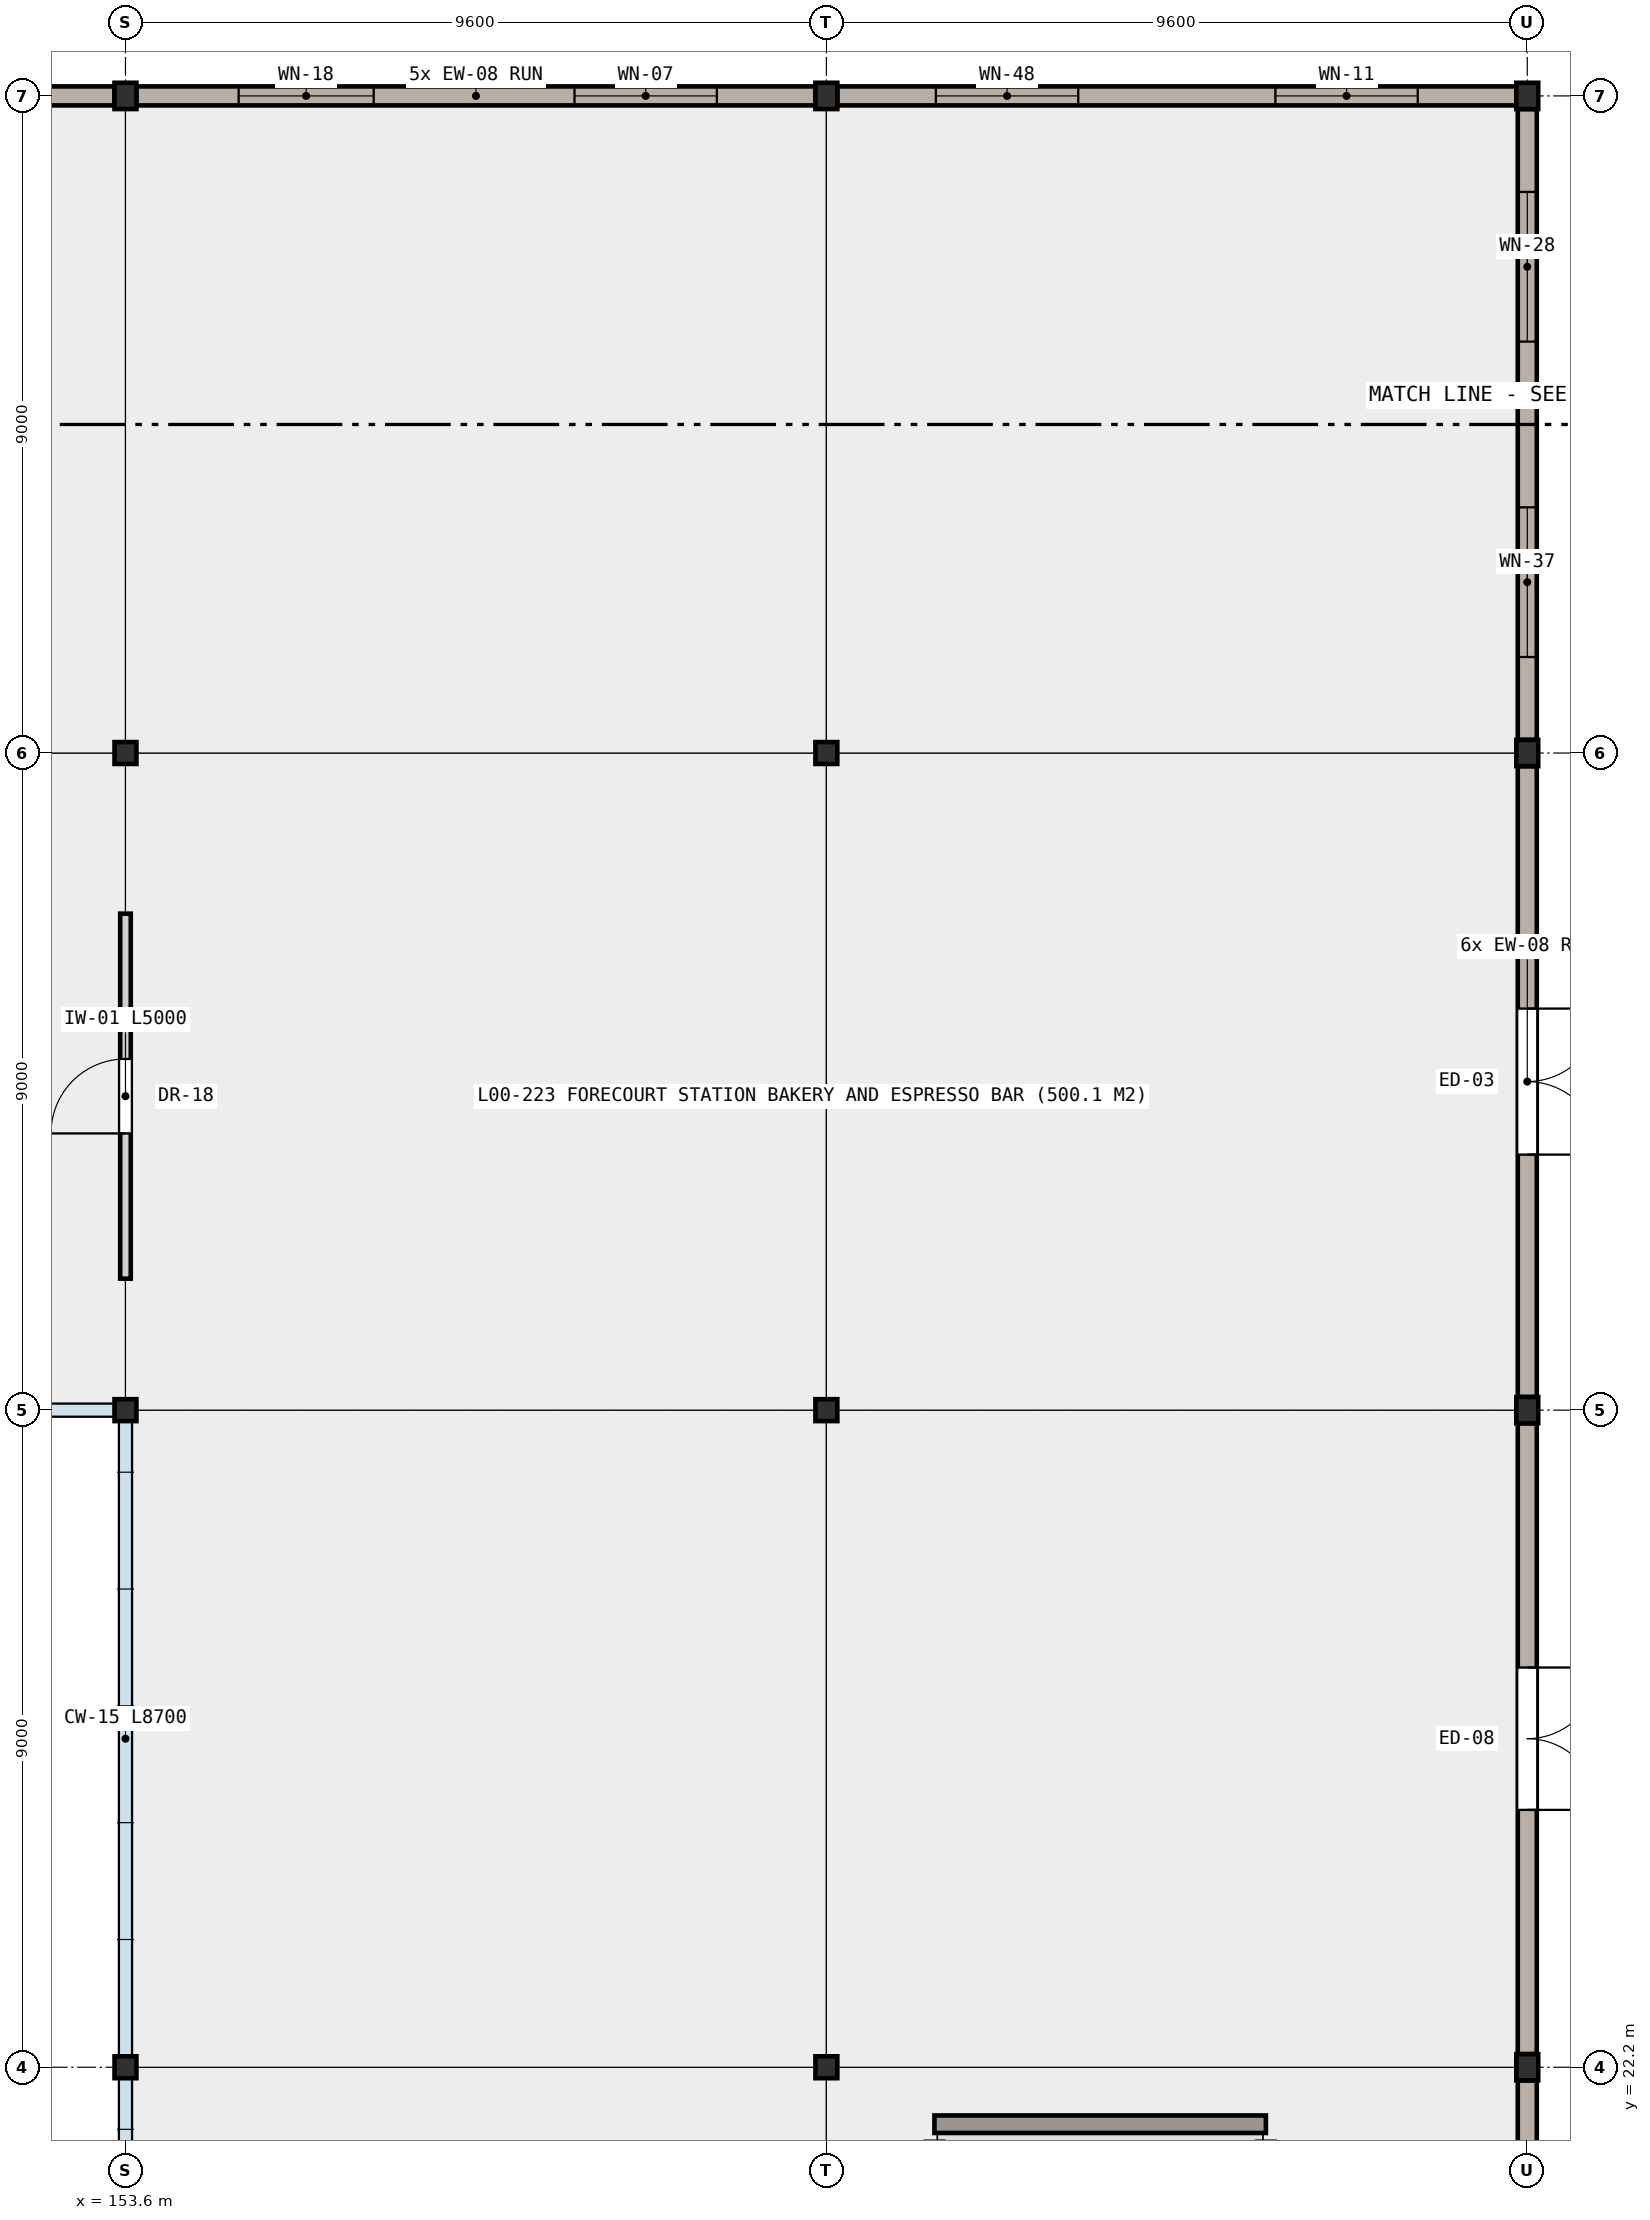
"""IFC4 building model, lengths in metres.
Left out: names, types, materials, properties, quantities, classifications, styles, units other than length and angle.
Written with IfcOpenShell. Run it as: python <this file> out.ifc"""

import sys

from ifc_helpers import new_model, si_unit, direction, frame, frame_2d, origin, origin_2d, place, context, subcontext, project, spatial, rectangle, i_section, extrude, element, fill, save


model = new_model("IFC4")
c1 = context("Model", 3, precision=1e-05, world=origin(), true_north=direction((0.0, 1.0)))
c2 = subcontext(c1, "Body", "Model", "MODEL_VIEW")
j1 = project(units=[si_unit("LENGTHUNIT", "METRE"), si_unit("PLANEANGLEUNIT", "RADIAN")], contexts=[c1])
p1 = place(None, origin())
s1 = spatial("IfcSite", under=j1, at=p1, CompositionType="ELEMENT")
p2 = place(p1, origin())
s2 = spatial("IfcBuilding", under=s1, at=p2, CompositionType="ELEMENT")
p3 = place(p2, origin())
s3 = spatial("IfcBuildingStorey", under=s2, at=p3, CompositionType="ELEMENT", Elevation=0.0)
for number, where, z_axis, x_axis in (
    (1, (153.6, 22.2, 0.0), (0.0, 0.0, 1.0), (1.0, 0.0, 0.0)),
    (2, (153.6, 31.2, 0.0), (0.0, 0.0, 1.0), (1.0, 0.0, 0.0)),
    (3, (153.6, 40.2, 0.0), (0.0, 0.0, 1.0), (1.0, 0.0, 0.0)),
):
    element("IfcColumn", number, at=place(p3, frame(where, z_axis=z_axis, x_axis=x_axis)), inside=s3, PredefinedType="COLUMN", context=c2, shape_type="SweptSolid", body=[
        extrude(i_section(OverallWidth=0.3, OverallDepth=0.3, WebThickness=0.011, FlangeThickness=0.019, FilletRadius=0.027, at=origin_2d()), origin(), (0.0, 0.0, 1.0), 5.4),
    ])
p4 = place(p3, frame((153.6, 49.2, 0.0), z_axis=(0.0, 0.0, 1.0), x_axis=(1.0, 0.0, 0.0)))
e4 = element("IfcColumn", 4, at=p4, inside=s3, PredefinedType="COLUMN", context=c2, shape_type="SweptSolid", body=[
    extrude(i_section(OverallWidth=0.3, OverallDepth=0.36, WebThickness=0.012, FlangeThickness=0.022, FilletRadius=0.027, at=origin_2d()), origin(), (0.0, 0.0, 1.0), 5.4),
])
for number, where, z_axis, x_axis in (
    (5, (163.2, 22.2, 0.0), (0.0, 0.0, 1.0), (1.0, 0.0, 0.0)),
    (6, (163.2, 31.2, 0.0), (0.0, 0.0, 1.0), (1.0, 0.0, 0.0)),
    (7, (163.2, 40.2, 0.0), (0.0, 0.0, 1.0), (1.0, 0.0, 0.0)),
):
    element("IfcColumn", number, at=place(p3, frame(where, z_axis=z_axis, x_axis=x_axis)), inside=s3, PredefinedType="COLUMN", context=c2, shape_type="SweptSolid", body=[
        extrude(i_section(OverallWidth=0.3, OverallDepth=0.3, WebThickness=0.011, FlangeThickness=0.019, FilletRadius=0.027, at=origin_2d()), origin(), (0.0, 0.0, 1.0), 5.4),
    ])
for number, where, z_axis, x_axis in (
    (8, (163.2, 49.2, 0.0), (0.0, 0.0, 1.0), (1.0, 0.0, 0.0)),
    (9, (172.8, 22.2, 0.0), (0.0, 0.0, 1.0), (1.0, 0.0, 0.0)),
    (10, (172.8, 31.2, 0.0), (0.0, 0.0, 1.0), (1.0, 0.0, 0.0)),
    (11, (172.8, 40.2, 0.0), (0.0, 0.0, 1.0), (1.0, 0.0, 0.0)),
    (12, (172.8, 49.2, 0.0), (0.0, 0.0, 1.0), (1.0, 0.0, 0.0)),
):
    element("IfcColumn", number, at=place(p3, frame(where, z_axis=z_axis, x_axis=x_axis)), inside=s3, PredefinedType="COLUMN", context=c2, shape_type="SweptSolid", body=[
        extrude(i_section(OverallWidth=0.3, OverallDepth=0.36, WebThickness=0.012, FlangeThickness=0.022, FilletRadius=0.027, at=origin_2d()), origin(), (0.0, 0.0, 1.0), 5.4),
    ])
p5 = place(p3, frame((144.15, 49.2, 0.0), z_axis=(0.0, 0.0, 1.0), x_axis=(1.0, 0.0, 0.0)))
e13 = element("IfcWall", 13, at=p5, inside=s3, PredefinedType="SOLIDWALL", context=c2, shape_type="SweptSolid", body=[
    extrude(rectangle(XDim=9.3, YDim=0.26, at=frame_2d((4.65, 0.0))), origin(), (0.0, 0.0, 1.0), 4.49),
])
p6 = place(p5, frame((1.4, 0.0, 0.85)))
e14 = element("IfcOpeningElement", 14, at=p6, cuts=e13, PredefinedType="OPENING", context=c2, shape_type="SweptSolid", body=[
    extrude(rectangle(XDim=1.85, YDim=1.5, at=frame_2d((0.925, 0.75))), frame((0.0, 0.14, 0.0), z_axis=(0.0, -1.0, 0.0), x_axis=(1.0, 0.0, 0.0)), (0.0, 0.0, 1.0), 0.28),
])
p7 = place(p5, frame((6.05, 0.0, 0.85)))
e15 = element("IfcOpeningElement", 15, at=p7, cuts=e13, PredefinedType="OPENING", context=c2, shape_type="SweptSolid", body=[
    extrude(rectangle(XDim=1.85, YDim=1.85, at=frame_2d((0.925, 0.925))), frame((0.0, 0.14, 0.0), z_axis=(0.0, -1.0, 0.0), x_axis=(1.0, 0.0, 0.0)), (0.0, 0.0, 1.0), 0.28),
])
p8 = place(p3, frame((153.75, 49.2, 0.0), z_axis=(0.0, 0.0, 1.0), x_axis=(1.0, 0.0, 0.0)))
e16 = element("IfcWall", 16, at=p8, inside=s3, PredefinedType="SOLIDWALL", context=c2, shape_type="SweptSolid", body=[
    extrude(rectangle(XDim=9.3, YDim=0.26, at=frame_2d((4.65, 0.0))), origin(), (0.0, 0.0, 1.0), 4.55),
])
p9 = place(p8, frame((1.4, 0.0, 0.85)))
e17 = element("IfcOpeningElement", 17, at=p9, cuts=e16, PredefinedType="OPENING", context=c2, shape_type="SweptSolid", body=[
    extrude(rectangle(XDim=1.85, YDim=2.15, at=frame_2d((0.925, 1.075))), frame((0.0, 0.14, 0.0), z_axis=(0.0, -1.0, 0.0), x_axis=(1.0, 0.0, 0.0)), (0.0, 0.0, 1.0), 0.28),
])
p10 = place(p8, frame((6.0, 0.0, 0.85)))
e18 = element("IfcOpeningElement", 18, at=p10, cuts=e16, PredefinedType="OPENING", context=c2, shape_type="SweptSolid", body=[
    extrude(rectangle(XDim=1.95, YDim=1.5, at=frame_2d((0.975, 0.75))), frame((0.0, 0.14, 0.0), z_axis=(0.0, -1.0, 0.0), x_axis=(1.0, 0.0, 0.0)), (0.0, 0.0, 1.0), 0.28),
])
p11 = place(p3, frame((163.35, 49.2, 0.0), z_axis=(0.0, 0.0, 1.0), x_axis=(1.0, 0.0, 0.0)))
e19 = element("IfcWall", 19, at=p11, inside=s3, PredefinedType="SOLIDWALL", context=c2, shape_type="SweptSolid", body=[
    extrude(rectangle(XDim=9.3, YDim=0.26, at=frame_2d((4.65, 0.0))), origin(), (0.0, 0.0, 1.0), 4.55),
])
p12 = place(p11, frame((1.35, 0.0, 0.85)))
e20 = element("IfcOpeningElement", 20, at=p12, cuts=e19, PredefinedType="OPENING", context=c2, shape_type="SweptSolid", body=[
    extrude(rectangle(XDim=1.95, YDim=1.85, at=frame_2d((0.975, 0.925))), frame((0.0, 0.14, 0.0), z_axis=(0.0, -1.0, 0.0), x_axis=(1.0, 0.0, 0.0)), (0.0, 0.0, 1.0), 0.28),
])
p13 = place(p11, frame((6.0, 0.0, 0.85)))
e21 = element("IfcOpeningElement", 21, at=p13, cuts=e19, PredefinedType="OPENING", context=c2, shape_type="SweptSolid", body=[
    extrude(rectangle(XDim=1.95, YDim=2.15, at=frame_2d((0.975, 1.075))), frame((0.0, 0.14, 0.0), z_axis=(0.0, -1.0, 0.0), x_axis=(1.0, 0.0, 0.0)), (0.0, 0.0, 1.0), 0.28),
])
p14 = place(p3, frame((172.8, 49.02, 0.0), z_axis=(0.0, 0.0, 1.0), x_axis=(0.0, -1.0, 0.0)))
e22 = element("IfcWall", 22, at=p14, inside=s3, PredefinedType="SOLIDWALL", context=c2, shape_type="SweptSolid", body=[
    extrude(rectangle(XDim=8.64, YDim=0.26, at=frame_2d((4.32, 0.0))), origin(), (0.0, 0.0, 1.0), 4.6),
])
p15 = place(p14, frame((1.135, 0.0, 0.85)))
e23 = element("IfcOpeningElement", 23, at=p15, cuts=e22, PredefinedType="OPENING", context=c2, shape_type="SweptSolid", body=[
    extrude(rectangle(XDim=2.05, YDim=1.5, at=frame_2d((1.025, 0.75))), frame((0.0, 0.14, 0.0), z_axis=(0.0, -1.0, 0.0), x_axis=(1.0, 0.0, 0.0)), (0.0, 0.0, 1.0), 0.28),
])
p16 = place(p14, frame((5.455, 0.0, 0.85)))
e24 = element("IfcOpeningElement", 24, at=p16, cuts=e22, PredefinedType="OPENING", context=c2, shape_type="SweptSolid", body=[
    extrude(rectangle(XDim=2.05, YDim=1.85, at=frame_2d((1.025, 0.925))), frame((0.0, 0.14, 0.0), z_axis=(0.0, -1.0, 0.0), x_axis=(1.0, 0.0, 0.0)), (0.0, 0.0, 1.0), 0.28),
])
p17 = place(p3, frame((172.8, 40.02, 0.0), z_axis=(0.0, 0.0, 1.0), x_axis=(0.0, -1.0, 0.0)))
e25 = element("IfcWall", 25, at=p17, inside=s3, PredefinedType="SOLIDWALL", context=c2, shape_type="SweptSolid", body=[
    extrude(rectangle(XDim=8.64, YDim=0.26, at=frame_2d((4.32, 0.0))), origin(), (0.0, 0.0, 1.0), 4.6),
])
p18 = place(p17, frame((3.32, 0.0, 0.0)))
e26 = element("IfcOpeningElement", 26, at=p18, cuts=e25, PredefinedType="OPENING", context=c2, shape_type="SweptSolid", body=[
    extrude(rectangle(XDim=2.0, YDim=2.45, at=frame_2d((1.0, 1.225))), frame((0.0, 0.14, 0.0), z_axis=(0.0, -1.0, 0.0), x_axis=(1.0, 0.0, 0.0)), (0.0, 0.0, 1.0), 0.28),
])
p19 = place(p3, frame((172.8, 31.02, 0.0), z_axis=(0.0, 0.0, 1.0), x_axis=(0.0, -1.0, 0.0)))
e27 = element("IfcWall", 27, at=p19, inside=s3, PredefinedType="SOLIDWALL", context=c2, shape_type="SweptSolid", body=[
    extrude(rectangle(XDim=8.64, YDim=0.26, at=frame_2d((4.32, 0.0))), origin(), (0.0, 0.0, 1.0), 4.6),
])
p20 = place(p19, frame((3.345, 0.0, 0.0)))
e28 = element("IfcOpeningElement", 28, at=p20, cuts=e27, PredefinedType="OPENING", context=c2, shape_type="SweptSolid", body=[
    extrude(rectangle(XDim=1.95, YDim=2.4, at=frame_2d((0.975, 1.2))), frame((0.0, 0.14, 0.0), z_axis=(0.0, -1.0, 0.0), x_axis=(1.0, 0.0, 0.0)), (0.0, 0.0, 1.0), 0.28),
])
p21 = place(p3, frame((172.8, 22.02, 0.0), z_axis=(0.0, 0.0, 1.0), x_axis=(0.0, -1.0, 0.0)))
e29 = element("IfcWall", 29, at=p21, inside=s3, PredefinedType="SOLIDWALL", context=c2, shape_type="SweptSolid", body=[
    extrude(rectangle(XDim=8.64, YDim=0.26, at=frame_2d((4.32, 0.0))), origin(), (0.0, 0.0, 1.0), 4.54),
])
p22 = place(p21, frame((1.135, 0.0, 0.85)))
e30 = element("IfcOpeningElement", 30, at=p22, cuts=e29, PredefinedType="OPENING", context=c2, shape_type="SweptSolid", body=[
    extrude(rectangle(XDim=2.05, YDim=2.15, at=frame_2d((1.025, 1.075))), frame((0.0, 0.14, 0.0), z_axis=(0.0, -1.0, 0.0), x_axis=(1.0, 0.0, 0.0)), (0.0, 0.0, 1.0), 0.28),
])
p23 = place(p21, frame((5.38, 0.0, 0.85)))
e31 = element("IfcOpeningElement", 31, at=p23, cuts=e29, PredefinedType="OPENING", context=c2, shape_type="SweptSolid", body=[
    extrude(rectangle(XDim=2.2, YDim=1.5, at=frame_2d((1.1, 0.75))), frame((0.0, 0.14, 0.0), z_axis=(0.0, -1.0, 0.0), x_axis=(1.0, 0.0, 0.0)), (0.0, 0.0, 1.0), 0.28),
])
p24 = place(p3, frame((164.68, 21.42, 0.0), z_axis=(0.0, 0.0, 1.0), x_axis=(1.0, 0.0, 0.0)))
e32 = element("IfcWall", 32, at=p24, inside=s3, PredefinedType="SHEAR", context=c2, shape_type="SweptSolid", body=[
    extrude(rectangle(XDim=4.54, YDim=0.24, at=frame_2d((2.27, 0.0))), origin(), (0.0, 0.0, 1.0), 5.12),
])
p25 = place(p3, frame((153.6, 33.0, 0.0), z_axis=(0.0, 0.0, 1.0), x_axis=(0.0, 1.0, 0.0)))
e33 = element("IfcWall", 33, at=p25, inside=s3, PredefinedType="PARTITIONING", context=c2, shape_type="SweptSolid", body=[
    extrude(rectangle(XDim=5.0, YDim=0.145, at=frame_2d((2.5, 0.0))), origin(), (0.0, 0.0, 1.0), 4.54),
])
p26 = place(p25, frame((1.99, 0.0, 0.0)))
e34 = element("IfcOpeningElement", 34, at=p26, cuts=e33, PredefinedType="OPENING", context=c2, shape_type="SweptSolid", body=[
    extrude(rectangle(XDim=1.02, YDim=2.14, at=frame_2d((0.51, 1.07))), frame((0.0, 0.083, 0.0), z_axis=(0.0, -1.0, 0.0), x_axis=(1.0, 0.0, 0.0)), (0.0, 0.0, 1.0), 0.165),
])
p27 = place(p9, origin())
e35 = element("IfcWindow", 35, at=p27, inside=s3, PartitioningType="SINGLE_PANEL", PredefinedType="WINDOW", context=c2, shape_type="SweptSolid", body=[
    extrude(rectangle(XDim=1.85, YDim=2.15, at=frame_2d((0.925, 1.075))), frame((0.0, 0.03, 0.0), z_axis=(0.0, -1.0, 0.0), x_axis=(1.0, 0.0, 0.0)), (0.0, 0.0, 1.0), 0.06),
])
fill(e17, e35)
p28 = place(p10, origin())
e36 = element("IfcWindow", 36, at=p28, inside=s3, PartitioningType="SINGLE_PANEL", PredefinedType="WINDOW", context=c2, shape_type="SweptSolid", body=[
    extrude(rectangle(XDim=1.95, YDim=1.5, at=frame_2d((0.975, 0.75))), frame((0.0, 0.03, 0.0), z_axis=(0.0, -1.0, 0.0), x_axis=(1.0, 0.0, 0.0)), (0.0, 0.0, 1.0), 0.06),
])
fill(e18, e36)
p29 = place(p12, origin())
e37 = element("IfcWindow", 37, at=p29, inside=s3, PartitioningType="SINGLE_PANEL", PredefinedType="WINDOW", context=c2, shape_type="SweptSolid", body=[
    extrude(rectangle(XDim=1.95, YDim=1.85, at=frame_2d((0.975, 0.925))), frame((0.0, 0.03, 0.0), z_axis=(0.0, -1.0, 0.0), x_axis=(1.0, 0.0, 0.0)), (0.0, 0.0, 1.0), 0.06),
])
fill(e20, e37)
p30 = place(p13, origin())
e38 = element("IfcWindow", 38, at=p30, inside=s3, PartitioningType="SINGLE_PANEL", PredefinedType="WINDOW", context=c2, shape_type="SweptSolid", body=[
    extrude(rectangle(XDim=1.95, YDim=2.15, at=frame_2d((0.975, 1.075))), frame((0.0, 0.03, 0.0), z_axis=(0.0, -1.0, 0.0), x_axis=(1.0, 0.0, 0.0)), (0.0, 0.0, 1.0), 0.06),
])
fill(e21, e38)
p31 = place(p15, origin())
e39 = element("IfcWindow", 39, at=p31, inside=s3, PartitioningType="SINGLE_PANEL", PredefinedType="WINDOW", context=c2, shape_type="SweptSolid", body=[
    extrude(rectangle(XDim=2.05, YDim=1.5, at=frame_2d((1.025, 0.75))), frame((0.0, 0.03, 0.0), z_axis=(0.0, -1.0, 0.0), x_axis=(1.0, 0.0, 0.0)), (0.0, 0.0, 1.0), 0.06),
])
fill(e23, e39)
p32 = place(p16, origin())
e40 = element("IfcWindow", 40, at=p32, inside=s3, PartitioningType="SINGLE_PANEL", PredefinedType="WINDOW", context=c2, shape_type="SweptSolid", body=[
    extrude(rectangle(XDim=2.05, YDim=1.85, at=frame_2d((1.025, 0.925))), frame((0.0, 0.03, 0.0), z_axis=(0.0, -1.0, 0.0), x_axis=(1.0, 0.0, 0.0)), (0.0, 0.0, 1.0), 0.06),
])
fill(e24, e40)
p33 = place(p18, origin())
e41 = element("IfcDoor", 41, at=p33, inside=s3, OperationType="DOUBLE_DOOR_SINGLE_SWING", PredefinedType="DOOR", context=c2, shape_type="SweptSolid", body=[
    extrude(rectangle(XDim=2.0, YDim=2.45, at=frame_2d((1.0, 1.225))), frame((0.0, 0.025, 0.0), z_axis=(0.0, -1.0, 0.0), x_axis=(1.0, 0.0, 0.0)), (0.0, 0.0, 1.0), 0.05),
])
fill(e26, e41)
p34 = place(p20, origin())
e42 = element("IfcDoor", 42, at=p34, inside=s3, OperationType="DOUBLE_DOOR_SINGLE_SWING", PredefinedType="DOOR", context=c2, shape_type="SweptSolid", body=[
    extrude(rectangle(XDim=1.95, YDim=2.4, at=frame_2d((0.975, 1.2))), frame((0.0, 0.025, 0.0), z_axis=(0.0, -1.0, 0.0), x_axis=(1.0, 0.0, 0.0)), (0.0, 0.0, 1.0), 0.05),
])
fill(e28, e42)
p35 = place(p26, origin())
e43 = element("IfcDoor", 43, at=p35, inside=s3, OperationType="SINGLE_SWING_LEFT", PredefinedType="DOOR", context=c2, shape_type="SweptSolid", body=[
    extrude(rectangle(XDim=1.02, YDim=2.14, at=frame_2d((0.51, 1.07))), frame((0.0, 0.025, 0.0), z_axis=(0.0, -1.0, 0.0), x_axis=(1.0, 0.0, 0.0)), (0.0, 0.0, 1.0), 0.05),
])
fill(e34, e43)
save(model, sys.argv[1])
